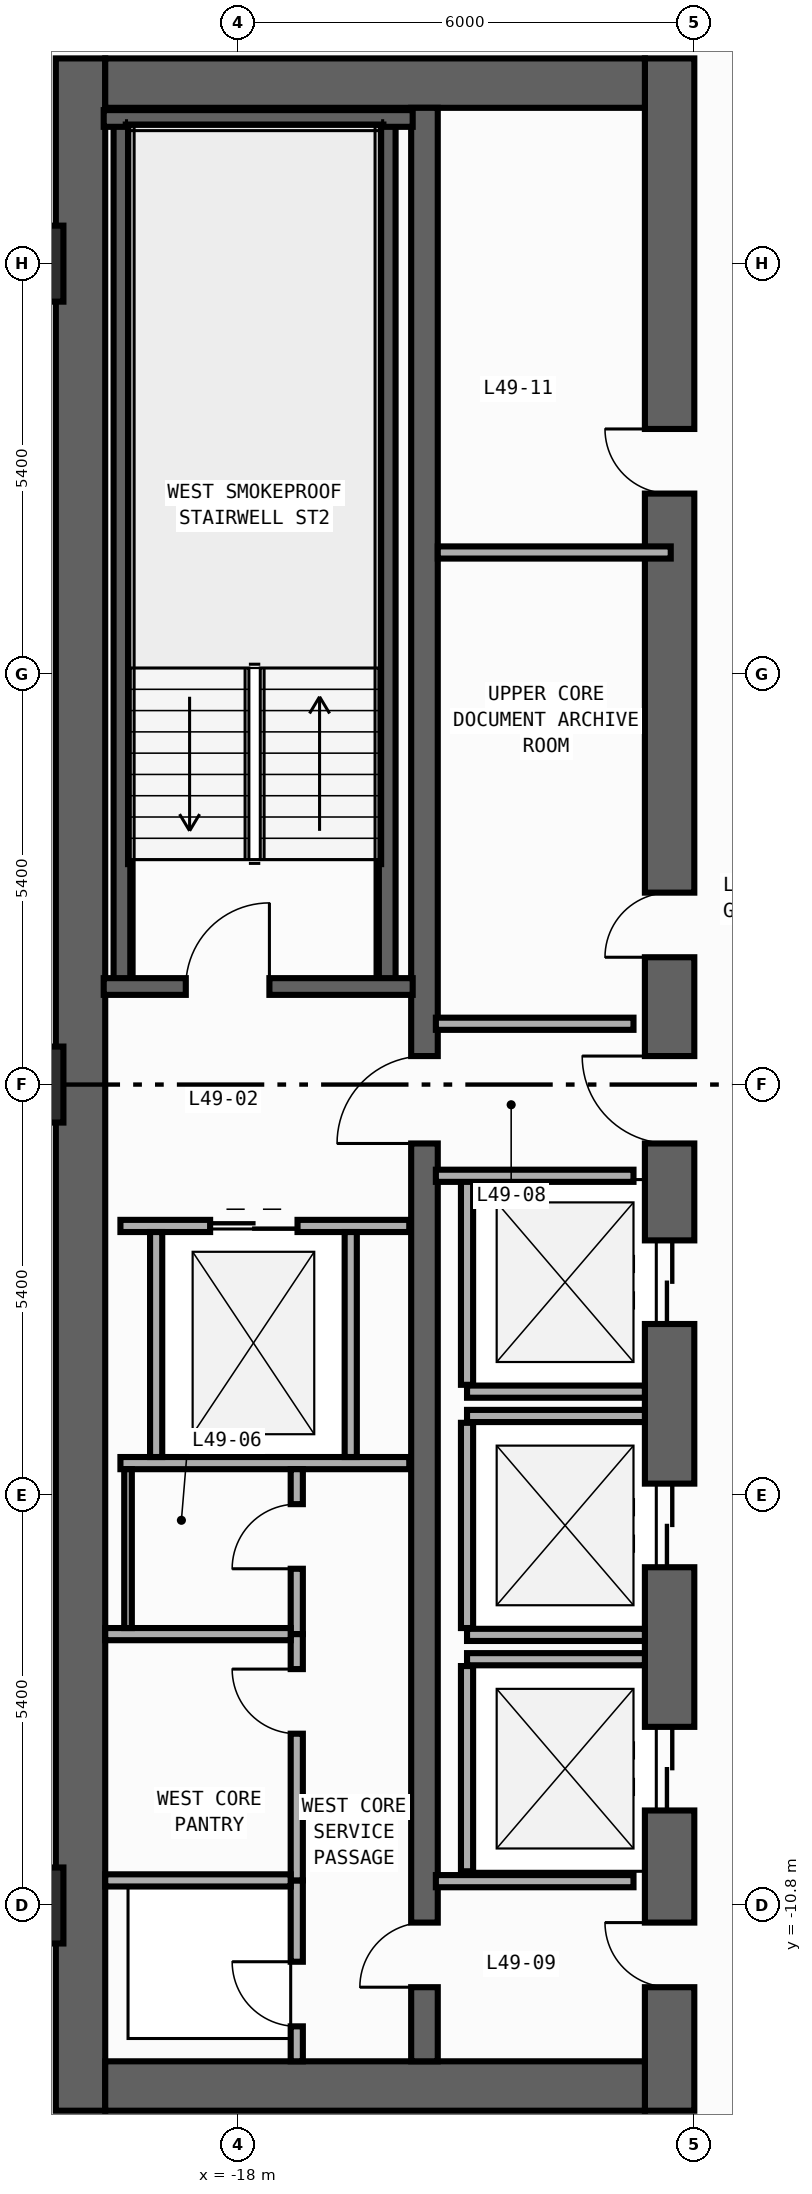
"""IFC4 building model, lengths in metres.
Left out: names, types, materials, properties, quantities, classifications, styles, units other than length and angle.
Written with IfcOpenShell. Run it as: python <this file> out.ifc"""

import sys

from ifc_helpers import new_model, si_unit, direction, frame, frame_2d, origin, origin_2d, place, context, subcontext, project, spatial, rectangle, extrude, element, fill, save


model = new_model("IFC4")
c1 = context("Model", 3, precision=1e-05, world=origin(), true_north=direction((0.0, 1.0)))
c2 = subcontext(c1, "Body", "Model", "MODEL_VIEW")
j1 = project(units=[si_unit("LENGTHUNIT", "METRE"), si_unit("PLANEANGLEUNIT", "RADIAN")], contexts=[c1])
p1 = place(None, origin())
s1 = spatial("IfcSite", under=j1, at=p1, CompositionType="ELEMENT")
p2 = place(p1, origin())
s2 = spatial("IfcBuilding", under=s1, at=p2, CompositionType="ELEMENT")
p3 = place(p2, frame((0.0, 0.0, 210.6)))
s3 = spatial("IfcBuildingStorey", under=s2, at=p3, CompositionType="ELEMENT", Elevation=210.6)
p4 = place(p3, frame((-20.075, -13.5, 0.0), z_axis=(0.0, 0.0, 1.0), x_axis=(0.0, 1.0, 0.0)))
e1 = element("IfcWall", 1, at=p4, inside=s3, PredefinedType="SHEAR", context=c2, shape_type="SweptSolid", body=[
    extrude(rectangle(XDim=27.0, YDim=0.65, at=frame_2d((13.5, 0.0))), origin(), (0.0, 0.0, 1.0), 3.45),
])
p5 = place(p3, frame((-12.325, -13.5, 0.0), z_axis=(0.0, 0.0, 1.0), x_axis=(0.0, 1.0, 0.0)))
e2 = element("IfcWall", 2, at=p5, inside=s3, PredefinedType="SHEAR", context=c2, shape_type="SweptSolid", body=[
    extrude(rectangle(XDim=27.0, YDim=0.65, at=frame_2d((13.5, 0.0))), origin(), (0.0, 0.0, 1.0), 3.45),
])
p6 = place(p5, frame((10.35, 0.0, 0.0)))
e3 = element("IfcOpeningElement", 3, at=p6, cuts=e2, PredefinedType="OPENING", context=c2, shape_type="SweptSolid", body=[
    extrude(rectangle(XDim=1.1, YDim=2.2, at=frame_2d((0.55, 1.1))), frame((0.0, 0.335, 0.0), z_axis=(0.0, -1.0, 0.0), x_axis=(1.0, 0.0, 0.0)), (0.0, 0.0, 1.0), 0.67),
])
p7 = place(p5, frame((7.15, 0.0, 0.0)))
e4 = element("IfcOpeningElement", 4, at=p7, cuts=e2, PredefinedType="OPENING", context=c2, shape_type="SweptSolid", body=[
    extrude(rectangle(XDim=1.1, YDim=2.2, at=frame_2d((0.55, 1.1))), frame((0.0, 0.335, 0.0), z_axis=(0.0, -1.0, 0.0), x_axis=(1.0, 0.0, 0.0)), (0.0, 0.0, 1.0), 0.67),
])
p8 = place(p5, frame((3.95, 0.0, 0.0)))
e5 = element("IfcOpeningElement", 5, at=p8, cuts=e2, PredefinedType="OPENING", context=c2, shape_type="SweptSolid", body=[
    extrude(rectangle(XDim=1.1, YDim=2.2, at=frame_2d((0.55, 1.1))), frame((0.0, 0.335, 0.0), z_axis=(0.0, -1.0, 0.0), x_axis=(1.0, 0.0, 0.0)), (0.0, 0.0, 1.0), 0.67),
])
p9 = place(p5, frame((15.175, 0.0, 0.0)))
e6 = element("IfcOpeningElement", 6, at=p9, cuts=e2, PredefinedType="OPENING", context=c2, shape_type="SweptSolid", body=[
    extrude(rectangle(XDim=0.85, YDim=2.1, at=frame_2d((0.425, 1.05))), frame((0.0, 0.335, 0.0), z_axis=(0.0, -1.0, 0.0), x_axis=(1.0, 0.0, 0.0)), (0.0, 0.0, 1.0), 0.67),
])
p10 = place(p5, frame((21.275, 0.0, 0.0)))
e7 = element("IfcOpeningElement", 7, at=p10, cuts=e2, PredefinedType="OPENING", context=c2, shape_type="SweptSolid", body=[
    extrude(rectangle(XDim=0.85, YDim=2.1, at=frame_2d((0.425, 1.05))), frame((0.0, 0.335, 0.0), z_axis=(0.0, -1.0, 0.0), x_axis=(1.0, 0.0, 0.0)), (0.0, 0.0, 1.0), 0.67),
])
p11 = place(p5, frame((12.725, 0.0, 0.0)))
e8 = element("IfcOpeningElement", 8, at=p11, cuts=e2, PredefinedType="OPENING", context=c2, shape_type="SweptSolid", body=[
    extrude(rectangle(XDim=1.15, YDim=2.2, at=frame_2d((0.575, 1.1))), frame((0.0, 0.335, 0.0), z_axis=(0.0, -1.0, 0.0), x_axis=(1.0, 0.0, 0.0)), (0.0, 0.0, 1.0), 0.67),
])
p12 = place(p5, frame((1.625, 0.0, 0.0)))
e9 = element("IfcOpeningElement", 9, at=p12, cuts=e2, PredefinedType="OPENING", context=c2, shape_type="SweptSolid", body=[
    extrude(rectangle(XDim=0.85, YDim=2.1, at=frame_2d((0.425, 1.05))), frame((0.0, 0.335, 0.0), z_axis=(0.0, -1.0, 0.0), x_axis=(1.0, 0.0, 0.0)), (0.0, 0.0, 1.0), 0.67),
])
for number, where, z_axis, x_axis in (
    (10, (-19.75, -13.175, 0.0), (0.0, 0.0, 1.0), (1.0, 0.0, 0.0)),
    (11, (-19.75, 13.175, 0.0), (0.0, 0.0, 1.0), (1.0, 0.0, 0.0)),
):
    element("IfcWall", number, at=place(p3, frame(where, z_axis=z_axis, x_axis=x_axis)), inside=s3, PredefinedType="SHEAR", context=c2, shape_type="SweptSolid", body=[
        extrude(rectangle(XDim=7.1, YDim=0.65, at=frame_2d((3.55, 0.0))), origin(), (0.0, 0.0, 1.0), 3.45),
    ])
p13 = place(p3, frame((-15.55, -12.85, 0.0), z_axis=(0.0, 0.0, 1.0), x_axis=(0.0, 1.0, 0.0)))
e12 = element("IfcWall", 12, at=p13, inside=s3, PredefinedType="SHEAR", context=c2, shape_type="SweptSolid", body=[
    extrude(rectangle(XDim=25.7, YDim=0.35, at=frame_2d((12.85, 0.0))), origin(), (0.0, 0.0, 1.0), 3.45),
])
p14 = place(p13, frame((12.075, 0.0, 0.0)))
e13 = element("IfcOpeningElement", 13, at=p14, cuts=e12, PredefinedType="OPENING", context=c2, shape_type="SweptSolid", body=[
    extrude(rectangle(XDim=1.15, YDim=2.2, at=frame_2d((0.575, 1.1))), frame((0.0, 0.185, 0.0), z_axis=(0.0, -1.0, 0.0), x_axis=(1.0, 0.0, 0.0)), (0.0, 0.0, 1.0), 0.37),
])
p15 = place(p13, frame((0.975, 0.0, 0.0)))
e14 = element("IfcOpeningElement", 14, at=p15, cuts=e12, PredefinedType="OPENING", context=c2, shape_type="SweptSolid", body=[
    extrude(rectangle(XDim=0.85, YDim=2.1, at=frame_2d((0.425, 1.05))), frame((0.0, 0.185, 0.0), z_axis=(0.0, -1.0, 0.0), x_axis=(1.0, 0.0, 0.0)), (0.0, 0.0, 1.0), 0.37),
])
for number, where, z_axis, x_axis in (
    (15, (-16.04, 1.29, 0.0), (0.0, 0.0, 1.0), (0.0, 1.0, 0.0)),
    (16, (-19.53, 1.29, 0.0), (0.0, 0.0, 1.0), (0.0, 1.0, 0.0)),
):
    element("IfcWall", number, at=place(p3, frame(where, z_axis=z_axis, x_axis=x_axis)), inside=s3, PredefinedType="SHEAR", context=c2, shape_type="SweptSolid", body=[
        extrude(rectangle(XDim=11.42, YDim=0.22, at=frame_2d((5.71, 0.0))), origin(), (0.0, 0.0, 1.0), 3.45),
    ])
p16 = place(p3, frame((-19.77, 12.71, 0.0), z_axis=(0.0, 0.0, 1.0), x_axis=(1.0, 0.0, 0.0)))
e17 = element("IfcWall", 17, at=p16, inside=s3, PredefinedType="SHEAR", context=c2, shape_type="SweptSolid", body=[
    extrude(rectangle(XDim=4.065, YDim=0.22, at=frame_2d((2.032, 0.0))), origin(), (0.0, 0.0, 1.0), 3.45),
])
p17 = place(p3, frame((-19.77, 1.29, 0.0), z_axis=(0.0, 0.0, 1.0), x_axis=(1.0, 0.0, 0.0)))
e18 = element("IfcWall", 18, at=p17, inside=s3, PredefinedType="SHEAR", context=c2, shape_type="SweptSolid", body=[
    extrude(rectangle(XDim=4.065, YDim=0.22, at=frame_2d((2.032, 0.0))), origin(), (0.0, 0.0, 1.0), 3.45),
])
p18 = place(p17, frame((1.08, 0.0, 0.0)))
e19 = element("IfcOpeningElement", 19, at=p18, cuts=e18, PredefinedType="OPENING", context=c2, shape_type="SweptSolid", body=[
    extrude(rectangle(XDim=1.1, YDim=2.2, at=frame_2d((0.55, 1.1))), frame((0.0, 0.12, 0.0), z_axis=(0.0, -1.0, 0.0), x_axis=(1.0, 0.0, 0.0)), (0.0, 0.0, 1.0), 0.24),
])
for number, where, z_axis, x_axis in (
    (20, (-20.8, -10.8, 0.0), (0.0, 0.0, 1.0), (1.0, 0.0, 0.0)),
    (21, (-20.8, 0.0, 0.0), (0.0, 0.0, 1.0), (1.0, 0.0, 0.0)),
    (22, (-20.8, 10.8, 0.0), (0.0, 0.0, 1.0), (1.0, 0.0, 0.0)),
):
    element("IfcColumn", number, at=place(p3, frame(where, z_axis=z_axis, x_axis=x_axis)), inside=s3, PredefinedType="COLUMN", context=c2, shape_type="SweptSolid", body=[
        extrude(rectangle(XDim=1.0, YDim=1.0, at=origin_2d()), origin(), (0.0, 0.0, 1.0), 3.8),
    ])
p19 = place(p3, frame((-14.99, -4.04, 0.0), z_axis=(0.0, 0.0, 1.0), x_axis=(1.0, 0.0, 0.0)))
e23 = element("IfcWall", 23, at=p19, inside=s3, PredefinedType="STANDARD", context=c2, shape_type="SweptSolid", body=[
    extrude(rectangle(XDim=2.34, YDim=0.16, at=frame_2d((1.17, 0.0))), origin(), (0.0, 0.0, 1.0), 3.45),
])
p20 = place(p3, frame((-14.99, -3.95, 0.0), z_axis=(0.0, 0.0, 1.0), x_axis=(0.0, 1.0, 0.0)))
e24 = element("IfcWall", 24, at=p20, inside=s3, PredefinedType="STANDARD", context=c2, shape_type="SweptSolid", body=[
    extrude(rectangle(XDim=2.7, YDim=0.16, at=frame_2d((1.35, 0.0))), origin(), (0.0, 0.0, 1.0), 3.45),
])
for number, where, z_axis, x_axis in (
    (25, (-14.99, -7.24, 0.0), (0.0, 0.0, 1.0), (1.0, 0.0, 0.0)),
    (26, (-14.99, -4.36, 0.0), (0.0, 0.0, 1.0), (1.0, 0.0, 0.0)),
):
    element("IfcWall", number, at=place(p3, frame(where, z_axis=z_axis, x_axis=x_axis)), inside=s3, PredefinedType="STANDARD", context=c2, shape_type="SweptSolid", body=[
        extrude(rectangle(XDim=2.34, YDim=0.16, at=frame_2d((1.17, 0.0))), origin(), (0.0, 0.0, 1.0), 3.45),
    ])
p21 = place(p3, frame((-14.99, -7.15, 0.0), z_axis=(0.0, 0.0, 1.0), x_axis=(0.0, 1.0, 0.0)))
e27 = element("IfcWall", 27, at=p21, inside=s3, PredefinedType="STANDARD", context=c2, shape_type="SweptSolid", body=[
    extrude(rectangle(XDim=2.7, YDim=0.16, at=frame_2d((1.35, 0.0))), origin(), (0.0, 0.0, 1.0), 3.45),
])
p22 = place(p3, frame((-14.99, -7.56, 0.0), z_axis=(0.0, 0.0, 1.0), x_axis=(1.0, 0.0, 0.0)))
e28 = element("IfcWall", 28, at=p22, inside=s3, PredefinedType="STANDARD", context=c2, shape_type="SweptSolid", body=[
    extrude(rectangle(XDim=2.34, YDim=0.16, at=frame_2d((1.17, 0.0))), origin(), (0.0, 0.0, 1.0), 3.45),
])
p23 = place(p3, frame((-14.99, -10.35, 0.0), z_axis=(0.0, 0.0, 1.0), x_axis=(0.0, 1.0, 0.0)))
e29 = element("IfcWall", 29, at=p23, inside=s3, PredefinedType="STANDARD", context=c2, shape_type="SweptSolid", body=[
    extrude(rectangle(XDim=2.7, YDim=0.16, at=frame_2d((1.35, 0.0))), origin(), (0.0, 0.0, 1.0), 3.45),
])
p24 = place(p3, frame((-19.55, -1.86, 0.0), z_axis=(0.0, 0.0, 1.0), x_axis=(1.0, 0.0, 0.0)))
e30 = element("IfcWall", 30, at=p24, inside=s3, PredefinedType="STANDARD", context=c2, shape_type="SweptSolid", body=[
    extrude(rectangle(XDim=3.8, YDim=0.16, at=frame_2d((1.9, 0.0))), origin(), (0.0, 0.0, 1.0), 3.45),
])
p25 = place(p24, frame((1.18, 0.0, 0.0)))
e31 = element("IfcOpeningElement", 31, at=p25, cuts=e30, PredefinedType="OPENING", context=c2, shape_type="SweptSolid", body=[
    extrude(rectangle(XDim=1.15, YDim=2.2, at=frame_2d((0.575, 1.1))), frame((0.0, 0.09, 0.0), z_axis=(0.0, -1.0, 0.0), x_axis=(1.0, 0.0, 0.0)), (0.0, 0.0, 1.0), 0.18),
])
p26 = place(p3, frame((-19.55, -4.98, 0.0), z_axis=(0.0, 0.0, 1.0), x_axis=(1.0, 0.0, 0.0)))
e32 = element("IfcWall", 32, at=p26, inside=s3, PredefinedType="STANDARD", context=c2, shape_type="SweptSolid", body=[
    extrude(rectangle(XDim=3.8, YDim=0.16, at=frame_2d((1.9, 0.0))), origin(), (0.0, 0.0, 1.0), 3.45),
])
for number, where, z_axis, x_axis in (
    (33, (-19.08, -4.9, 0.0), (0.0, 0.0, 1.0), (0.0, 1.0, 0.0)),
    (34, (-16.52, -4.9, 0.0), (0.0, 0.0, 1.0), (0.0, 1.0, 0.0)),
):
    element("IfcWall", number, at=place(p3, frame(where, z_axis=z_axis, x_axis=x_axis)), inside=s3, PredefinedType="STANDARD", context=c2, shape_type="SweptSolid", body=[
        extrude(rectangle(XDim=2.96, YDim=0.16, at=frame_2d((1.48, 0.0))), origin(), (0.0, 0.0, 1.0), 3.45),
    ])
for number, where, z_axis, x_axis in (
    (35, (-15.4, 0.8, 0.0), (0.0, 0.0, 1.0), (1.0, 0.0, 0.0)),
    (36, (-15.4, -1.2, 0.0), (0.0, 0.0, 1.0), (1.0, 0.0, 0.0)),
    (37, (-15.4, -10.48, 0.0), (0.0, 0.0, 1.0), (1.0, 0.0, 0.0)),
):
    element("IfcWall", number, at=place(p3, frame(where, z_axis=z_axis, x_axis=x_axis)), inside=s3, PredefinedType="STANDARD", context=c2, shape_type="SweptSolid", body=[
        extrude(rectangle(XDim=2.6, YDim=0.16, at=frame_2d((1.3, 0.0))), origin(), (0.0, 0.0, 1.0), 3.45),
    ])
p27 = place(p3, frame((-17.23, -12.85, 0.0), z_axis=(0.0, 0.0, 1.0), x_axis=(0.0, 1.0, 0.0)))
e38 = element("IfcWall", 38, at=p27, inside=s3, PredefinedType="PARTITIONING", context=c2, shape_type="SweptSolid", body=[
    extrude(rectangle(XDim=2.38, YDim=0.16, at=frame_2d((1.19, 0.0))), origin(), (0.0, 0.0, 1.0), 3.45),
])
p28 = place(p27, frame((0.46, 0.0, 0.0)))
e39 = element("IfcOpeningElement", 39, at=p28, cuts=e38, PredefinedType="OPENING", context=c2, shape_type="SweptSolid", body=[
    extrude(rectangle(XDim=0.85, YDim=2.1, at=frame_2d((0.425, 1.05))), frame((0.0, 0.09, 0.0), z_axis=(0.0, -1.0, 0.0), x_axis=(1.0, 0.0, 0.0)), (0.0, 0.0, 1.0), 0.18),
])
p29 = place(p3, frame((-17.23, -7.23, 0.0), z_axis=(0.0, 0.0, 1.0), x_axis=(0.0, 1.0, 0.0)))
e40 = element("IfcWall", 40, at=p29, inside=s3, PredefinedType="PARTITIONING", context=c2, shape_type="SweptSolid", body=[
    extrude(rectangle(XDim=2.17, YDim=0.16, at=frame_2d((1.085, 0.0))), origin(), (0.0, 0.0, 1.0), 3.45),
])
p30 = place(p29, frame((0.86, 0.0, 0.0)))
e41 = element("IfcOpeningElement", 41, at=p30, cuts=e40, PredefinedType="OPENING", context=c2, shape_type="SweptSolid", body=[
    extrude(rectangle(XDim=0.85, YDim=2.1, at=frame_2d((0.425, 1.05))), frame((0.0, 0.09, 0.0), z_axis=(0.0, -1.0, 0.0), x_axis=(1.0, 0.0, 0.0)), (0.0, 0.0, 1.0), 0.18),
])
p31 = place(p3, frame((-17.23, -10.47, 0.0), z_axis=(0.0, 0.0, 1.0), x_axis=(0.0, 1.0, 0.0)))
e42 = element("IfcWall", 42, at=p31, inside=s3, PredefinedType="PARTITIONING", context=c2, shape_type="SweptSolid", body=[
    extrude(rectangle(XDim=3.24, YDim=0.16, at=frame_2d((1.62, 0.0))), origin(), (0.0, 0.0, 1.0), 3.45),
])
p32 = place(p31, frame((1.93, 0.0, 0.0)))
e43 = element("IfcOpeningElement", 43, at=p32, cuts=e42, PredefinedType="OPENING", context=c2, shape_type="SweptSolid", body=[
    extrude(rectangle(XDim=0.85, YDim=2.1, at=frame_2d((0.425, 1.05))), frame((0.0, 0.09, 0.0), z_axis=(0.0, -1.0, 0.0), x_axis=(1.0, 0.0, 0.0)), (0.0, 0.0, 1.0), 0.18),
])
for number, where, z_axis, x_axis in (
    (44, (-19.75, -10.47, 0.0), (0.0, 0.0, 1.0), (1.0, 0.0, 0.0)),
    (45, (-19.75, -7.23, 0.0), (0.0, 0.0, 1.0), (1.0, 0.0, 0.0)),
):
    element("IfcWall", number, at=place(p3, frame(where, z_axis=z_axis, x_axis=x_axis)), inside=s3, PredefinedType="PARTITIONING", context=c2, shape_type="SweptSolid", body=[
        extrude(rectangle(XDim=2.44, YDim=0.16, at=frame_2d((1.22, 0.0))), origin(), (0.0, 0.0, 1.0), 3.45),
    ])
p33 = place(p3, frame((-15.375, 7.0, 0.0), z_axis=(0.0, 0.0, 1.0), x_axis=(1.0, 0.0, 0.0)))
e46 = element("IfcWall", 46, at=p33, inside=s3, PredefinedType="PARTITIONING", context=c2, shape_type="SweptSolid", body=[
    extrude(rectangle(XDim=3.065, YDim=0.16, at=frame_2d((1.532, 0.0))), origin(), (0.0, 0.0, 1.0), 3.45),
])
p34 = place(p3, frame((-19.45, -7.15, 0.0), z_axis=(0.0, 0.0, 1.0), x_axis=(0.0, 1.0, 0.0)))
e47 = element("IfcWall", 47, at=p34, inside=s3, PredefinedType="PARTITIONING", context=c2, shape_type="SweptSolid", body=[
    extrude(rectangle(XDim=2.09, YDim=0.1, at=frame_2d((1.045, 0.0))), origin(), (0.0, 0.0, 1.0), 3.45),
])
p35 = place(p18, origin())
e48 = element("IfcDoor", 48, at=p35, inside=s3, OperationType="SINGLE_SWING_RIGHT", PredefinedType="DOOR", context=c2, shape_type="SweptSolid", body=[
    extrude(rectangle(XDim=1.1, YDim=2.2, at=frame_2d((0.55, 1.1))), frame((0.0, 0.025, 0.0), z_axis=(0.0, -1.0, 0.0), x_axis=(1.0, 0.0, 0.0)), (0.0, 0.0, 1.0), 0.05),
])
fill(e19, e48)
p36 = place(p6, origin())
e49 = element("IfcDoor", 49, at=p36, inside=s3, OperationType="DOUBLE_DOOR_SLIDING", PredefinedType="DOOR", context=c2, shape_type="SweptSolid", body=[
    extrude(rectangle(XDim=1.1, YDim=2.2, at=frame_2d((0.55, 1.1))), frame((0.0, 0.025, 0.0), z_axis=(0.0, -1.0, 0.0), x_axis=(1.0, 0.0, 0.0)), (0.0, 0.0, 1.0), 0.05),
])
fill(e3, e49)
p37 = place(p7, origin())
e50 = element("IfcDoor", 50, at=p37, inside=s3, OperationType="DOUBLE_DOOR_SLIDING", PredefinedType="DOOR", context=c2, shape_type="SweptSolid", body=[
    extrude(rectangle(XDim=1.1, YDim=2.2, at=frame_2d((0.55, 1.1))), frame((0.0, 0.025, 0.0), z_axis=(0.0, -1.0, 0.0), x_axis=(1.0, 0.0, 0.0)), (0.0, 0.0, 1.0), 0.05),
])
fill(e4, e50)
p38 = place(p8, origin())
e51 = element("IfcDoor", 51, at=p38, inside=s3, OperationType="DOUBLE_DOOR_SLIDING", PredefinedType="DOOR", context=c2, shape_type="SweptSolid", body=[
    extrude(rectangle(XDim=1.1, YDim=2.2, at=frame_2d((0.55, 1.1))), frame((0.0, 0.025, 0.0), z_axis=(0.0, -1.0, 0.0), x_axis=(1.0, 0.0, 0.0)), (0.0, 0.0, 1.0), 0.05),
])
fill(e5, e51)
p39 = place(p9, origin())
e52 = element("IfcDoor", 52, at=p39, inside=s3, OperationType="SINGLE_SWING_LEFT", PredefinedType="DOOR", context=c2, shape_type="SweptSolid", body=[
    extrude(rectangle(XDim=0.85, YDim=2.1, at=frame_2d((0.425, 1.05))), frame((0.0, 0.025, 0.0), z_axis=(0.0, -1.0, 0.0), x_axis=(1.0, 0.0, 0.0)), (0.0, 0.0, 1.0), 0.05),
])
fill(e6, e52)
p40 = place(p10, origin())
e53 = element("IfcDoor", 53, at=p40, inside=s3, OperationType="SINGLE_SWING_RIGHT", PredefinedType="DOOR", context=c2, shape_type="SweptSolid", body=[
    extrude(rectangle(XDim=0.85, YDim=2.1, at=frame_2d((0.425, 1.05))), frame((0.0, 0.025, 0.0), z_axis=(0.0, -1.0, 0.0), x_axis=(1.0, 0.0, 0.0)), (0.0, 0.0, 1.0), 0.05),
])
fill(e7, e53)
p41 = place(p11, origin())
e54 = element("IfcDoor", 54, at=p41, inside=s3, OperationType="SINGLE_SWING_RIGHT", PredefinedType="DOOR", context=c2, shape_type="SweptSolid", body=[
    extrude(rectangle(XDim=1.15, YDim=2.2, at=frame_2d((0.575, 1.1))), frame((0.0, 0.025, 0.0), z_axis=(0.0, -1.0, 0.0), x_axis=(1.0, 0.0, 0.0)), (0.0, 0.0, 1.0), 0.05),
])
fill(e8, e54)
p42 = place(p14, origin())
e55 = element("IfcDoor", 55, at=p42, inside=s3, OperationType="SINGLE_SWING_LEFT", PredefinedType="DOOR", context=c2, shape_type="SweptSolid", body=[
    extrude(rectangle(XDim=1.15, YDim=2.2, at=frame_2d((0.575, 1.1))), frame((0.0, 0.025, 0.0), z_axis=(0.0, -1.0, 0.0), x_axis=(1.0, 0.0, 0.0)), (0.0, 0.0, 1.0), 0.05),
])
fill(e13, e55)
p43 = place(p12, origin())
e56 = element("IfcDoor", 56, at=p43, inside=s3, OperationType="SINGLE_SWING_RIGHT", PredefinedType="DOOR", context=c2, shape_type="SweptSolid", body=[
    extrude(rectangle(XDim=0.85, YDim=2.1, at=frame_2d((0.425, 1.05))), frame((0.0, 0.025, 0.0), z_axis=(0.0, -1.0, 0.0), x_axis=(1.0, 0.0, 0.0)), (0.0, 0.0, 1.0), 0.05),
])
fill(e9, e56)
p44 = place(p15, origin())
e57 = element("IfcDoor", 57, at=p44, inside=s3, OperationType="SINGLE_SWING_LEFT", PredefinedType="DOOR", context=c2, shape_type="SweptSolid", body=[
    extrude(rectangle(XDim=0.85, YDim=2.1, at=frame_2d((0.425, 1.05))), frame((0.0, 0.025, 0.0), z_axis=(0.0, -1.0, 0.0), x_axis=(1.0, 0.0, 0.0)), (0.0, 0.0, 1.0), 0.05),
])
fill(e14, e57)
p45 = place(p25, origin())
e58 = element("IfcDoor", 58, at=p45, inside=s3, OperationType="DOUBLE_DOOR_SLIDING", PredefinedType="DOOR", context=c2, shape_type="SweptSolid", body=[
    extrude(rectangle(XDim=1.15, YDim=2.2, at=frame_2d((0.575, 1.1))), frame((0.0, 0.025, 0.0), z_axis=(0.0, -1.0, 0.0), x_axis=(1.0, 0.0, 0.0)), (0.0, 0.0, 1.0), 0.05),
])
fill(e31, e58)
p46 = place(p28, origin())
e59 = element("IfcDoor", 59, at=p46, inside=s3, OperationType="SINGLE_SWING_RIGHT", PredefinedType="DOOR", context=c2, shape_type="SweptSolid", body=[
    extrude(rectangle(XDim=0.85, YDim=2.1, at=frame_2d((0.425, 1.05))), frame((0.0, 0.025, 0.0), z_axis=(0.0, -1.0, 0.0), x_axis=(1.0, 0.0, 0.0)), (0.0, 0.0, 1.0), 0.05),
])
fill(e39, e59)
p47 = place(p30, origin())
e60 = element("IfcDoor", 60, at=p47, inside=s3, OperationType="SINGLE_SWING_LEFT", PredefinedType="DOOR", context=c2, shape_type="SweptSolid", body=[
    extrude(rectangle(XDim=0.85, YDim=2.1, at=frame_2d((0.425, 1.05))), frame((0.0, 0.025, 0.0), z_axis=(0.0, -1.0, 0.0), x_axis=(1.0, 0.0, 0.0)), (0.0, 0.0, 1.0), 0.05),
])
fill(e41, e60)
p48 = place(p32, origin())
e61 = element("IfcDoor", 61, at=p48, inside=s3, OperationType="SINGLE_SWING_RIGHT", PredefinedType="DOOR", context=c2, shape_type="SweptSolid", body=[
    extrude(rectangle(XDim=0.85, YDim=2.1, at=frame_2d((0.425, 1.05))), frame((0.0, 0.025, 0.0), z_axis=(0.0, -1.0, 0.0), x_axis=(1.0, 0.0, 0.0)), (0.0, 0.0, 1.0), 0.05),
])
fill(e43, e61)
save(model, sys.argv[1])
